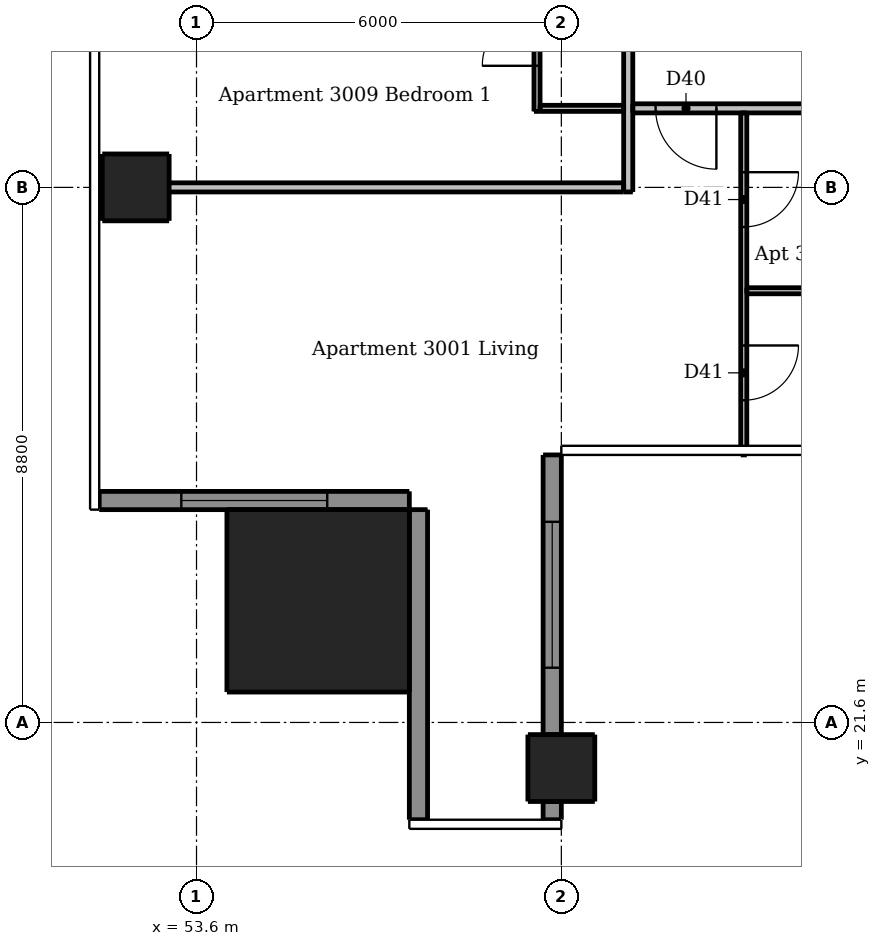
"""IFC4 building model, lengths in metres.
Left out: names, types, materials, properties, quantities, classifications, styles, units other than length and angle.
Written with IfcOpenShell. Run it as: python <this file> out.ifc"""

import sys

from ifc_helpers import new_model, si_unit, direction, frame, frame_2d, origin, origin_2d, place, context, subcontext, project, spatial, rectangle, extrude, element, fill, save


model = new_model("IFC4")
c1 = context("Model", 3, precision=1e-05, world=origin(), true_north=direction((0.0, 1.0)))
c2 = subcontext(c1, "Body", "Model", "MODEL_VIEW")
j1 = project(units=[si_unit("LENGTHUNIT", "METRE"), si_unit("PLANEANGLEUNIT", "RADIAN")], contexts=[c1])
p1 = place(None, origin())
s1 = spatial("IfcSite", under=j1, at=p1, CompositionType="ELEMENT")
p2 = place(p1, origin())
s2 = spatial("IfcBuilding", under=s1, at=p2, CompositionType="ELEMENT")
p3 = place(p2, frame((0.0, 0.0, 111.7)))
s3 = spatial("IfcBuildingStorey", under=s2, at=p3, CompositionType="ELEMENT", Elevation=111.7)
for number, where, z_axis, x_axis in (
    (1, (59.6, 20.85, 0.0), (0.0, 0.0, 1.0), (1.0, 0.0, 0.0)),
    (2, (52.6, 30.4, 0.0), (0.0, 0.0, 1.0), (1.0, 0.0, 0.0)),
):
    element("IfcColumn", number, at=place(p3, frame(where, z_axis=z_axis, x_axis=x_axis)), inside=s3, PredefinedType="COLUMN", context=c2, shape_type="SweptSolid", body=[
        extrude(rectangle(XDim=1.1, YDim=1.1, at=origin_2d()), origin(), (0.0, 0.0, 1.0), 3.05),
    ])
p4 = place(p3, frame((55.6, 23.6, 0.0), z_axis=(0.0, 0.0, 1.0), x_axis=(1.0, 0.0, 0.0)))
e3 = element("IfcColumn", 3, at=p4, inside=s3, PredefinedType="COLUMN", context=c2, shape_type="SweptSolid", body=[
    extrude(rectangle(XDim=3.0, YDim=3.0, at=origin_2d()), origin(), (0.0, 0.0, 1.0), 3.3),
])
p5 = place(p3, frame((59.45, 20.0, 0.0), z_axis=(0.0, 0.0, 1.0), x_axis=(0.0, 1.0, 0.0)))
e4 = element("IfcWall", 4, at=p5, inside=s3, PredefinedType="SOLIDWALL", context=c2, shape_type="SweptSolid", body=[
    extrude(rectangle(XDim=0.3, YDim=0.3, at=frame_2d((0.15, 0.0))), origin(), (0.0, 0.0, 1.0), 3.05),
])
p6 = place(p3, frame((59.45, 21.4, 0.0), z_axis=(0.0, 0.0, 1.0), x_axis=(0.0, 1.0, 0.0)))
e5 = element("IfcWall", 5, at=p6, inside=s3, PredefinedType="SOLIDWALL", context=c2, shape_type="SweptSolid", body=[
    extrude(rectangle(XDim=4.6, YDim=0.3, at=frame_2d((2.3, 0.0))), origin(), (0.0, 0.0, 1.0), 3.05),
])
p7 = place(p6, frame((1.1, 0.0, 0.15)))
e6 = element("IfcOpeningElement", 6, at=p7, cuts=e5, PredefinedType="OPENING", context=c2, shape_type="SweptSolid", body=[
    extrude(rectangle(XDim=2.4, YDim=2.1, at=frame_2d((1.2, 1.05))), frame((0.0, 0.16, 0.0), z_axis=(0.0, -1.0, 0.0), x_axis=(1.0, 0.0, 0.0)), (0.0, 0.0, 1.0), 0.32),
])
p8 = place(p3, frame((52.0, 25.25, 0.0), z_axis=(0.0, 0.0, 1.0), x_axis=(1.0, 0.0, 0.0)))
e7 = element("IfcWall", 7, at=p8, inside=s3, PredefinedType="SOLIDWALL", context=c2, shape_type="SweptSolid", body=[
    extrude(rectangle(XDim=5.1, YDim=0.3, at=frame_2d((2.55, 0.0))), origin(), (0.0, 0.0, 1.0), 3.05),
])
p9 = place(p8, frame((1.35, 0.0, 0.15)))
e8 = element("IfcOpeningElement", 8, at=p9, cuts=e7, PredefinedType="OPENING", context=c2, shape_type="SweptSolid", body=[
    extrude(rectangle(XDim=2.4, YDim=2.1, at=frame_2d((1.2, 1.05))), frame((0.0, 0.16, 0.0), z_axis=(0.0, -1.0, 0.0), x_axis=(1.0, 0.0, 0.0)), (0.0, 0.0, 1.0), 0.32),
])
p10 = place(p3, frame((57.25, 25.1, 0.0), z_axis=(0.0, 0.0, 1.0), x_axis=(0.0, -1.0, 0.0)))
e9 = element("IfcWall", 9, at=p10, inside=s3, PredefinedType="SOLIDWALL", context=c2, shape_type="SweptSolid", body=[
    extrude(rectangle(XDim=5.1, YDim=0.3, at=frame_2d((2.55, 0.0))), origin(), (0.0, 0.0, 1.0), 3.05),
])
p11 = place(p3, frame((59.2, 31.65, 0.0), z_axis=(0.0, 0.0, 1.0), x_axis=(0.0, 1.0, 0.0)))
e10 = element("IfcWall", 10, at=p11, inside=s3, PredefinedType="PARTITIONING", context=c2, shape_type="SweptSolid", body=[
    extrude(rectangle(XDim=16.675, YDim=0.1, at=frame_2d((8.337, 0.0))), origin(), (0.0, 0.0, 1.0), 3.05),
])
p12 = place(p11, frame((12.1, 0.0, 0.0)))
e11 = element("IfcOpeningElement", 11, at=p12, cuts=e10, PredefinedType="OPENING", context=c2, shape_type="SweptSolid", body=[
    extrude(rectangle(XDim=0.9, YDim=2.1, at=frame_2d((0.45, 1.05))), frame((0.0, 0.06, 0.0), z_axis=(0.0, -1.0, 0.0), x_axis=(1.0, 0.0, 0.0)), (0.0, 0.0, 1.0), 0.12),
])
p13 = place(p11, frame((15.1, 0.0, 0.0)))
e12 = element("IfcOpeningElement", 12, at=p13, cuts=e10, PredefinedType="OPENING", context=c2, shape_type="SweptSolid", body=[
    extrude(rectangle(XDim=0.9, YDim=2.1, at=frame_2d((0.45, 1.05))), frame((0.0, 0.06, 0.0), z_axis=(0.0, -1.0, 0.0), x_axis=(1.0, 0.0, 0.0)), (0.0, 0.0, 1.0), 0.12),
])
p14 = place(p11, frame((0.75, 0.0, 0.0)))
e13 = element("IfcOpeningElement", 13, at=p14, cuts=e10, PredefinedType="OPENING", context=c2, shape_type="SweptSolid", body=[
    extrude(rectangle(XDim=0.9, YDim=2.1, at=frame_2d((0.45, 1.05))), frame((0.0, 0.06, 0.0), z_axis=(0.0, -1.0, 0.0), x_axis=(1.0, 0.0, 0.0)), (0.0, 0.0, 1.0), 0.12),
])
p15 = place(p11, frame((6.1, 0.0, 0.0)))
e14 = element("IfcOpeningElement", 14, at=p15, cuts=e10, PredefinedType="OPENING", context=c2, shape_type="SweptSolid", body=[
    extrude(rectangle(XDim=0.9, YDim=2.1, at=frame_2d((0.45, 1.05))), frame((0.0, 0.06, 0.0), z_axis=(0.0, -1.0, 0.0), x_axis=(1.0, 0.0, 0.0)), (0.0, 0.0, 1.0), 0.12),
])
p16 = place(p11, frame((3.15, 0.0, 0.0)))
e15 = element("IfcOpeningElement", 15, at=p16, cuts=e10, PredefinedType="OPENING", context=c2, shape_type="SweptSolid", body=[
    extrude(rectangle(XDim=0.8, YDim=2.1, at=frame_2d((0.4, 1.05))), frame((0.0, 0.06, 0.0), z_axis=(0.0, -1.0, 0.0), x_axis=(1.0, 0.0, 0.0)), (0.0, 0.0, 1.0), 0.12),
])
p17 = place(p11, frame((9.15, 0.0, 0.0)))
e16 = element("IfcOpeningElement", 16, at=p17, cuts=e10, PredefinedType="OPENING", context=c2, shape_type="SweptSolid", body=[
    extrude(rectangle(XDim=0.8, YDim=2.1, at=frame_2d((0.4, 1.05))), frame((0.0, 0.06, 0.0), z_axis=(0.0, -1.0, 0.0), x_axis=(1.0, 0.0, 0.0)), (0.0, 0.0, 1.0), 0.12),
])
p18 = place(p3, frame((62.6, 31.625, 0.0), z_axis=(0.0, 0.0, 1.0), x_axis=(0.0, -1.0, 0.0)))
e17 = element("IfcWall", 17, at=p18, inside=s3, PredefinedType="PARTITIONING", context=c2, shape_type="SweptSolid", body=[
    extrude(rectangle(XDim=5.625, YDim=0.1, at=frame_2d((2.812, 0.0))), origin(), (0.0, 0.0, 1.0), 3.05),
])
p19 = place(p18, frame((0.975, 0.0, 0.0)))
e18 = element("IfcOpeningElement", 18, at=p19, cuts=e17, PredefinedType="OPENING", context=c2, shape_type="SweptSolid", body=[
    extrude(rectangle(XDim=0.9, YDim=2.1, at=frame_2d((0.45, 1.05))), frame((0.0, 0.06, 0.0), z_axis=(0.0, -1.0, 0.0), x_axis=(1.0, 0.0, 0.0)), (0.0, 0.0, 1.0), 0.12),
])
p20 = place(p18, frame((3.825, 0.0, 0.0)))
e19 = element("IfcOpeningElement", 19, at=p20, cuts=e17, PredefinedType="OPENING", context=c2, shape_type="SweptSolid", body=[
    extrude(rectangle(XDim=0.9, YDim=2.1, at=frame_2d((0.45, 1.05))), frame((0.0, 0.06, 0.0), z_axis=(0.0, -1.0, 0.0), x_axis=(1.0, 0.0, 0.0)), (0.0, 0.0, 1.0), 0.12),
])
p21 = place(p3, frame((59.25, 31.7, 0.0), z_axis=(0.0, 0.0, 1.0), x_axis=(1.0, 0.0, 0.0)))
e20 = element("IfcWall", 20, at=p21, inside=s3, PredefinedType="PARTITIONING", context=c2, shape_type="SweptSolid", body=[
    extrude(rectangle(XDim=1.375, YDim=0.1, at=frame_2d((0.688, 0.0))), origin(), (0.0, 0.0, 1.0), 3.05),
])
p22 = place(p3, frame((62.65, 28.7, 0.0), z_axis=(0.0, 0.0, 1.0), x_axis=(1.0, 0.0, 0.0)))
e21 = element("IfcWall", 21, at=p22, inside=s3, PredefinedType="PARTITIONING", context=c2, shape_type="SweptSolid", body=[
    extrude(rectangle(XDim=5.875, YDim=0.1, at=frame_2d((2.938, 0.0))), origin(), (0.0, 0.0, 1.0), 3.05),
])
p23 = place(p22, frame((3.75, 0.0, 0.0)))
e22 = element("IfcOpeningElement", 22, at=p23, cuts=e21, PredefinedType="OPENING", context=c2, shape_type="SweptSolid", body=[
    extrude(rectangle(XDim=0.8, YDim=2.1, at=frame_2d((0.4, 1.05))), frame((0.0, 0.06, 0.0), z_axis=(0.0, -1.0, 0.0), x_axis=(1.0, 0.0, 0.0)), (0.0, 0.0, 1.0), 0.12),
])
p24 = place(p3, frame((60.7, 30.325, 0.0), z_axis=(0.0, 0.0, 1.0), x_axis=(0.0, 1.0, 0.0)))
e23 = element("IfcWall", 23, at=p24, inside=s3, PredefinedType="PARTITIONING", context=c2, shape_type="SweptSolid", body=[
    extrude(rectangle(XDim=28.9, YDim=0.15, at=frame_2d((14.45, 0.0))), origin(), (0.0, 0.0, 1.0), 3.05),
])
p25 = place(p24, frame((9.225, 0.0, 0.0)))
e24 = element("IfcOpeningElement", 24, at=p25, cuts=e23, PredefinedType="OPENING", context=c2, shape_type="SweptSolid", body=[
    extrude(rectangle(XDim=1.0, YDim=2.1, at=frame_2d((0.5, 1.05))), frame((0.0, 0.085, 0.0), z_axis=(0.0, -1.0, 0.0), x_axis=(1.0, 0.0, 0.0)), (0.0, 0.0, 1.0), 0.17),
])
p26 = place(p24, frame((26.025, 0.0, 0.0)))
e25 = element("IfcOpeningElement", 25, at=p26, cuts=e23, PredefinedType="OPENING", context=c2, shape_type="SweptSolid", body=[
    extrude(rectangle(XDim=1.0, YDim=2.1, at=frame_2d((0.5, 1.05))), frame((0.0, 0.085, 0.0), z_axis=(0.0, -1.0, 0.0), x_axis=(1.0, 0.0, 0.0)), (0.0, 0.0, 1.0), 0.17),
])
p27 = place(p3, frame((89.525, 31.7, 0.0), z_axis=(0.0, 0.0, 1.0), x_axis=(-1.0, 0.0, 0.0)))
e26 = element("IfcWall", 26, at=p27, inside=s3, PredefinedType="PARTITIONING", context=c2, shape_type="SweptSolid", body=[
    extrude(rectangle(XDim=28.75, YDim=0.15, at=frame_2d((14.375, 0.0))), origin(), (0.0, 0.0, 1.0), 3.05),
])
p28 = place(p27, frame((27.375, 0.0, 0.0)))
e27 = element("IfcOpeningElement", 27, at=p28, cuts=e26, PredefinedType="OPENING", context=c2, shape_type="SweptSolid", body=[
    extrude(rectangle(XDim=1.0, YDim=2.1, at=frame_2d((0.5, 1.05))), frame((0.0, 0.085, 0.0), z_axis=(0.0, -1.0, 0.0), x_axis=(1.0, 0.0, 0.0)), (0.0, 0.0, 1.0), 0.17),
])
p29 = place(p27, frame((12.625, 0.0, 0.0)))
e28 = element("IfcOpeningElement", 28, at=p29, cuts=e26, PredefinedType="OPENING", context=c2, shape_type="SweptSolid", body=[
    extrude(rectangle(XDim=1.0, YDim=2.1, at=frame_2d((0.5, 1.05))), frame((0.0, 0.085, 0.0), z_axis=(0.0, -1.0, 0.0), x_axis=(1.0, 0.0, 0.0)), (0.0, 0.0, 1.0), 0.17),
])
p30 = place(p27, frame((2.425, 0.0, 0.0)))
e29 = element("IfcOpeningElement", 29, at=p30, cuts=e26, PredefinedType="OPENING", context=c2, shape_type="SweptSolid", body=[
    extrude(rectangle(XDim=1.0, YDim=2.1, at=frame_2d((0.5, 1.05))), frame((0.0, 0.085, 0.0), z_axis=(0.0, -1.0, 0.0), x_axis=(1.0, 0.0, 0.0)), (0.0, 0.0, 1.0), 0.17),
])
p31 = place(p3, frame((52.0, 30.4, 0.0), z_axis=(0.0, 0.0, 1.0), x_axis=(1.0, 0.0, 0.0)))
e30 = element("IfcWall", 30, at=p31, inside=s3, PredefinedType="PARTITIONING", context=c2, shape_type="SweptSolid", body=[
    extrude(rectangle(XDim=8.625, YDim=0.15, at=frame_2d((4.312, 0.0))), origin(), (0.0, 0.0, 1.0), 2.647),
])
p32 = place(p7, origin())
e31 = element("IfcWindow", 31, at=p32, inside=s3, PartitioningType="DOUBLE_PANEL_VERTICAL", PredefinedType="WINDOW", context=c2, shape_type="SweptSolid", body=[
    extrude(rectangle(XDim=2.4, YDim=2.1, at=frame_2d((1.2, 1.05))), frame((0.0, 0.03, 0.0), z_axis=(0.0, -1.0, 0.0), x_axis=(1.0, 0.0, 0.0)), (0.0, 0.0, 1.0), 0.06),
])
fill(e6, e31)
p33 = place(p9, origin())
e32 = element("IfcWindow", 32, at=p33, inside=s3, PartitioningType="DOUBLE_PANEL_VERTICAL", PredefinedType="WINDOW", context=c2, shape_type="SweptSolid", body=[
    extrude(rectangle(XDim=2.4, YDim=2.1, at=frame_2d((1.2, 1.05))), frame((0.0, 0.03, 0.0), z_axis=(0.0, -1.0, 0.0), x_axis=(1.0, 0.0, 0.0)), (0.0, 0.0, 1.0), 0.06),
])
fill(e8, e32)
p34 = place(p28, origin())
e33 = element("IfcDoor", 33, at=p34, inside=s3, OperationType="SINGLE_SWING_LEFT", PredefinedType="DOOR", context=c2, shape_type="SweptSolid", body=[
    extrude(rectangle(XDim=1.0, YDim=2.1, at=frame_2d((0.5, 1.05))), frame((0.0, 0.025, 0.0), z_axis=(0.0, -1.0, 0.0), x_axis=(1.0, 0.0, 0.0)), (0.0, 0.0, 1.0), 0.05),
])
fill(e27, e33)
p35 = place(p19, origin())
e34 = element("IfcDoor", 34, at=p35, inside=s3, OperationType="SINGLE_SWING_LEFT", PredefinedType="DOOR", context=c2, shape_type="SweptSolid", body=[
    extrude(rectangle(XDim=0.9, YDim=2.1, at=frame_2d((0.45, 1.05))), frame((0.0, 0.025, 0.0), z_axis=(0.0, -1.0, 0.0), x_axis=(1.0, 0.0, 0.0)), (0.0, 0.0, 1.0), 0.05),
])
fill(e18, e34)
p36 = place(p20, origin())
e35 = element("IfcDoor", 35, at=p36, inside=s3, OperationType="SINGLE_SWING_LEFT", PredefinedType="DOOR", context=c2, shape_type="SweptSolid", body=[
    extrude(rectangle(XDim=0.9, YDim=2.1, at=frame_2d((0.45, 1.05))), frame((0.0, 0.025, 0.0), z_axis=(0.0, -1.0, 0.0), x_axis=(1.0, 0.0, 0.0)), (0.0, 0.0, 1.0), 0.05),
])
fill(e19, e35)
p37 = place(p14, origin())
e36 = element("IfcDoor", 36, at=p37, inside=s3, OperationType="SINGLE_SWING_LEFT", PredefinedType="DOOR", context=c2, shape_type="SweptSolid", body=[
    extrude(rectangle(XDim=0.9, YDim=2.1, at=frame_2d((0.45, 1.05))), frame((0.0, 0.025, 0.0), z_axis=(0.0, -1.0, 0.0), x_axis=(1.0, 0.0, 0.0)), (0.0, 0.0, 1.0), 0.05),
])
fill(e13, e36)
save(model, sys.argv[1])
